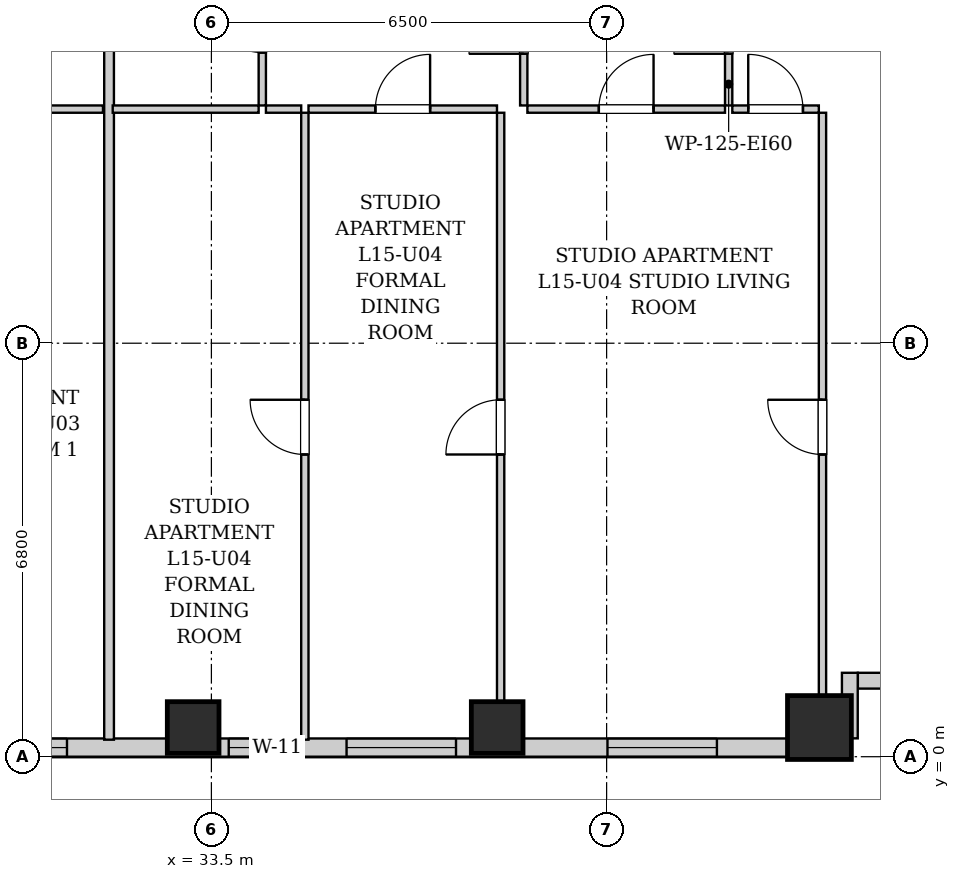
"""IFC4 building model, lengths in metres.
Left out: names, types, materials, properties, quantities, classifications, styles, units other than length and angle.
Written with IfcOpenShell. Run it as: python <this file> out.ifc"""

import sys

from ifc_helpers import new_model, si_unit, direction, frame, frame_2d, origin, origin_2d, place, context, subcontext, project, spatial, rectangle, extrude, element, fill, save


model = new_model("IFC4")
c1 = context("Model", 3, precision=1e-05, world=origin(), true_north=direction((0.0, 1.0)))
c2 = subcontext(c1, "Body", "Model", "MODEL_VIEW")
j1 = project(units=[si_unit("LENGTHUNIT", "METRE"), si_unit("PLANEANGLEUNIT", "RADIAN")], contexts=[c1])
p1 = place(None, origin())
s1 = spatial("IfcSite", under=j1, at=p1, CompositionType="ELEMENT")
p2 = place(p1, origin())
s2 = spatial("IfcBuilding", under=s1, at=p2, CompositionType="ELEMENT")
p3 = place(p2, frame((0.0, 0.0, 57.8)))
s3 = spatial("IfcBuildingStorey", under=s2, at=p3, CompositionType="ELEMENT", Elevation=57.8)
for number, where, z_axis, x_axis in (
    (1, (33.2, 0.48, 0.0), (0.0, 0.0, 1.0), (1.0, 0.0, 0.0)),
    (2, (38.2, 0.48, 0.0), (0.0, 0.0, 1.0), (1.0, 0.0, 0.0)),
):
    element("IfcColumn", number, at=place(p3, frame(where, z_axis=z_axis, x_axis=x_axis)), inside=s3, PredefinedType="COLUMN", context=c2, shape_type="SweptSolid", body=[
        extrude(rectangle(XDim=0.85, YDim=0.85, at=origin_2d()), origin(), (0.0, 0.0, 1.0), 3.2),
    ])
p4 = place(p3, frame((43.5, 0.48, 0.0), z_axis=(0.0, 0.0, 1.0), x_axis=(1.0, 0.0, 0.0)))
e3 = element("IfcColumn", 3, at=p4, inside=s3, PredefinedType="COLUMN", context=c2, shape_type="SweptSolid", body=[
    extrude(rectangle(XDim=1.05, YDim=1.05, at=origin_2d()), origin(), (0.0, 0.0, 1.0), 3.2),
])
p5 = place(p3, frame((44.0, 0.15, 0.0), z_axis=(0.0, 0.0, 1.0), x_axis=(-1.0, 0.0, 0.0)))
e4 = element("IfcWall", 4, at=p5, inside=s3, PredefinedType="SOLIDWALL", context=c2, shape_type="SweptSolid", body=[
    extrude(rectangle(XDim=27.55, YDim=0.3, at=frame_2d((13.775, 0.0))), origin(), (0.0, 0.0, 1.0), 1.975),
])
p6 = place(p5, frame((23.64, 0.0, 0.55)))
e5 = element("IfcOpeningElement", 5, at=p6, cuts=e4, PredefinedType="OPENING", context=c2, shape_type="SweptSolid", body=[
    extrude(rectangle(XDim=1.8, YDim=1.2, at=frame_2d((0.9, 0.6))), frame((0.0, 0.16, 0.0), z_axis=(0.0, -1.0, 0.0), x_axis=(1.0, 0.0, 0.0)), (0.0, 0.0, 1.0), 0.32),
])
p7 = place(p5, frame((21.5, 0.0, 0.55)))
e6 = element("IfcOpeningElement", 6, at=p7, cuts=e4, PredefinedType="OPENING", context=c2, shape_type="SweptSolid", body=[
    extrude(rectangle(XDim=0.85, YDim=1.2, at=frame_2d((0.425, 0.6))), frame((0.0, 0.16, 0.0), z_axis=(0.0, -1.0, 0.0), x_axis=(1.0, 0.0, 0.0)), (0.0, 0.0, 1.0), 0.32),
])
p8 = place(p5, frame((15.65, 0.0, 0.55)))
e7 = element("IfcOpeningElement", 7, at=p8, cuts=e4, PredefinedType="OPENING", context=c2, shape_type="SweptSolid", body=[
    extrude(rectangle(XDim=0.85, YDim=1.2, at=frame_2d((0.425, 0.6))), frame((0.0, 0.16, 0.0), z_axis=(0.0, -1.0, 0.0), x_axis=(1.0, 0.0, 0.0)), (0.0, 0.0, 1.0), 0.32),
])
p9 = place(p5, frame((12.875, 0.0, 0.55)))
e8 = element("IfcOpeningElement", 8, at=p9, cuts=e4, PredefinedType="OPENING", context=c2, shape_type="SweptSolid", body=[
    extrude(rectangle(XDim=1.8, YDim=1.2, at=frame_2d((0.9, 0.6))), frame((0.0, 0.16, 0.0), z_axis=(0.0, -1.0, 0.0), x_axis=(1.0, 0.0, 0.0)), (0.0, 0.0, 1.0), 0.32),
])
p10 = place(p5, frame((9.365, 0.0, 0.55)))
e9 = element("IfcOpeningElement", 9, at=p10, cuts=e4, PredefinedType="OPENING", context=c2, shape_type="SweptSolid", body=[
    extrude(rectangle(XDim=0.85, YDim=1.2, at=frame_2d((0.425, 0.6))), frame((0.0, 0.16, 0.0), z_axis=(0.0, -1.0, 0.0), x_axis=(1.0, 0.0, 0.0)), (0.0, 0.0, 1.0), 0.32),
])
p11 = place(p5, frame((6.477, 0.0, 0.55)))
e10 = element("IfcOpeningElement", 10, at=p11, cuts=e4, PredefinedType="OPENING", context=c2, shape_type="SweptSolid", body=[
    extrude(rectangle(XDim=1.8, YDim=1.2, at=frame_2d((0.9, 0.6))), frame((0.0, 0.16, 0.0), z_axis=(0.0, -1.0, 0.0), x_axis=(1.0, 0.0, 0.0)), (0.0, 0.0, 1.0), 0.32),
])
p12 = place(p5, frame((2.186, 0.0, 0.55)))
e11 = element("IfcOpeningElement", 11, at=p12, cuts=e4, PredefinedType="OPENING", context=c2, shape_type="SweptSolid", body=[
    extrude(rectangle(XDim=1.8, YDim=1.2, at=frame_2d((0.9, 0.6))), frame((0.0, 0.16, 0.0), z_axis=(0.0, -1.0, 0.0), x_axis=(1.0, 0.0, 0.0)), (0.0, 0.0, 1.0), 0.32),
])
p13 = place(p3, frame((45.118, 1.25, 0.0), z_axis=(0.0, 0.0, 1.0), x_axis=(-1.0, 0.0, 0.0)))
e12 = element("IfcWall", 12, at=p13, inside=s3, PredefinedType="SOLIDWALL", context=c2, shape_type="SweptSolid", body=[
    extrude(rectangle(XDim=0.986, YDim=0.26, at=frame_2d((0.493, 0.0))), origin(), (0.0, 0.0, 1.0), 2.94),
])
p14 = place(p3, frame((44.0, 1.38, 0.0), z_axis=(0.0, 0.0, 1.0), x_axis=(0.0, -1.0, 0.0)))
e13 = element("IfcWall", 13, at=p14, inside=s3, PredefinedType="SOLIDWALL", context=c2, shape_type="SweptSolid", body=[
    extrude(rectangle(XDim=1.078, YDim=0.26, at=frame_2d((0.539, 0.0))), origin(), (0.0, 0.0, 1.0), 2.94),
])
p15 = place(p3, frame((28.799, 10.65, 0.0), z_axis=(0.0, 0.0, 1.0), x_axis=(1.0, 0.0, 0.0)))
e14 = element("IfcWall", 14, at=p15, inside=s3, PredefinedType="PARTITIONING", context=c2, shape_type="SweptSolid", body=[
    extrude(rectangle(XDim=2.918, YDim=0.12, at=frame_2d((1.459, 0.0))), origin(), (0.0, 0.0, 1.0), 2.94),
])
p16 = place(p15, frame((1.009, 0.0, 0.0)))
e15 = element("IfcOpeningElement", 15, at=p16, cuts=e14, PredefinedType="OPENING", context=c2, shape_type="SweptSolid", body=[
    extrude(rectangle(XDim=0.9, YDim=2.05, at=frame_2d((0.45, 1.025))), frame((0.0, 0.07, 0.0), z_axis=(0.0, -1.0, 0.0), x_axis=(1.0, 0.0, 0.0)), (0.0, 0.0, 1.0), 0.14),
])
p17 = place(p3, frame((31.817, 0.28, 0.0), z_axis=(0.0, 0.0, 1.0), x_axis=(0.0, 1.0, 0.0)))
e16 = element("IfcWall", 16, at=p17, inside=s3, PredefinedType="PARTITIONING", context=c2, shape_type="SweptSolid", body=[
    extrude(rectangle(XDim=13.03, YDim=0.16, at=frame_2d((6.515, 0.0))), origin(), (0.0, 0.0, 1.0), 2.94),
])
p18 = place(p3, frame((34.337, 10.71, 0.0), z_axis=(0.0, 0.0, 1.0), x_axis=(0.0, 1.0, 0.0)))
e17 = element("IfcWall", 17, at=p18, inside=s3, PredefinedType="PARTITIONING", context=c2, shape_type="SweptSolid", body=[
    extrude(rectangle(XDim=2.6, YDim=0.12, at=frame_2d((1.3, 0.0))), origin(), (0.0, 0.0, 1.0), 2.94),
])
p19 = place(p18, frame((0.87, 0.0, 0.0)))
e18 = element("IfcOpeningElement", 18, at=p19, cuts=e17, PredefinedType="OPENING", context=c2, shape_type="SweptSolid", body=[
    extrude(rectangle(XDim=0.86, YDim=2.05, at=frame_2d((0.43, 1.025))), frame((0.0, 0.07, 0.0), z_axis=(0.0, -1.0, 0.0), x_axis=(1.0, 0.0, 0.0)), (0.0, 0.0, 1.0), 0.14),
])
p20 = place(p3, frame((31.877, 10.65, 0.0), z_axis=(0.0, 0.0, 1.0), x_axis=(1.0, 0.0, 0.0)))
e19 = element("IfcWall", 19, at=p20, inside=s3, PredefinedType="PARTITIONING", context=c2, shape_type="SweptSolid", body=[
    extrude(rectangle(XDim=2.4, YDim=0.12, at=frame_2d((1.2, 0.0))), origin(), (0.0, 0.0, 1.0), 2.94),
])
p21 = place(p3, frame((38.637, 10.71, 0.0), z_axis=(0.0, 0.0, 1.0), x_axis=(0.0, 1.0, 0.0)))
e20 = element("IfcWall", 20, at=p21, inside=s3, PredefinedType="PARTITIONING", context=c2, shape_type="SweptSolid", body=[
    extrude(rectangle(XDim=2.6, YDim=0.12, at=frame_2d((1.3, 0.0))), origin(), (0.0, 0.0, 1.0), 2.94),
])
p22 = place(p21, frame((0.85, 0.0, 0.0)))
e21 = element("IfcOpeningElement", 21, at=p22, cuts=e20, PredefinedType="OPENING", context=c2, shape_type="SweptSolid", body=[
    extrude(rectangle(XDim=0.9, YDim=2.05, at=frame_2d((0.45, 1.025))), frame((0.0, 0.07, 0.0), z_axis=(0.0, -1.0, 0.0), x_axis=(1.0, 0.0, 0.0)), (0.0, 0.0, 1.0), 0.14),
])
p23 = place(p3, frame((34.397, 10.65, 0.0), z_axis=(0.0, 0.0, 1.0), x_axis=(1.0, 0.0, 0.0)))
e22 = element("IfcWall", 22, at=p23, inside=s3, PredefinedType="PARTITIONING", context=c2, shape_type="SweptSolid", body=[
    extrude(rectangle(XDim=0.58, YDim=0.12, at=frame_2d((0.29, 0.0))), origin(), (0.0, 0.0, 1.0), 2.94),
])
p24 = place(p3, frame((35.097, 10.65, 0.0), z_axis=(0.0, 0.0, 1.0), x_axis=(1.0, 0.0, 0.0)))
e23 = element("IfcWall", 23, at=p24, inside=s3, PredefinedType="PARTITIONING", context=c2, shape_type="SweptSolid", body=[
    extrude(rectangle(XDim=3.1, YDim=0.12, at=frame_2d((1.55, 0.0))), origin(), (0.0, 0.0, 1.0), 2.94),
])
p25 = place(p24, frame((1.1, 0.0, 0.0)))
e24 = element("IfcOpeningElement", 24, at=p25, cuts=e23, PredefinedType="OPENING", context=c2, shape_type="SweptSolid", body=[
    extrude(rectangle(XDim=0.9, YDim=2.05, at=frame_2d((0.45, 1.025))), frame((0.0, 0.07, 0.0), z_axis=(0.0, -1.0, 0.0), x_axis=(1.0, 0.0, 0.0)), (0.0, 0.0, 1.0), 0.14),
])
p26 = place(p3, frame((42.007, 10.71, 0.0), z_axis=(0.0, 0.0, 1.0), x_axis=(0.0, 1.0, 0.0)))
e25 = element("IfcWall", 25, at=p26, inside=s3, PredefinedType="PARTITIONING", context=c2, shape_type="SweptSolid", body=[
    extrude(rectangle(XDim=2.6, YDim=0.12, at=frame_2d((1.3, 0.0))), origin(), (0.0, 0.0, 1.0), 2.94),
])
p27 = place(p26, frame((0.85, 0.0, 0.0)))
e26 = element("IfcOpeningElement", 26, at=p27, cuts=e25, PredefinedType="OPENING", context=c2, shape_type="SweptSolid", body=[
    extrude(rectangle(XDim=0.9, YDim=2.05, at=frame_2d((0.45, 1.025))), frame((0.0, 0.07, 0.0), z_axis=(0.0, -1.0, 0.0), x_axis=(1.0, 0.0, 0.0)), (0.0, 0.0, 1.0), 0.14),
])
p28 = place(p3, frame((38.697, 10.65, 0.0), z_axis=(0.0, 0.0, 1.0), x_axis=(1.0, 0.0, 0.0)))
e27 = element("IfcWall", 27, at=p28, inside=s3, PredefinedType="PARTITIONING", context=c2, shape_type="SweptSolid", body=[
    extrude(rectangle(XDim=3.25, YDim=0.12, at=frame_2d((1.625, 0.0))), origin(), (0.0, 0.0, 1.0), 2.94),
])
p29 = place(p28, frame((1.175, 0.0, 0.0)))
e28 = element("IfcOpeningElement", 28, at=p29, cuts=e27, PredefinedType="OPENING", context=c2, shape_type="SweptSolid", body=[
    extrude(rectangle(XDim=0.9, YDim=2.05, at=frame_2d((0.45, 1.025))), frame((0.0, 0.07, 0.0), z_axis=(0.0, -1.0, 0.0), x_axis=(1.0, 0.0, 0.0)), (0.0, 0.0, 1.0), 0.14),
])
p30 = place(p3, frame((42.067, 10.65, 0.0), z_axis=(0.0, 0.0, 1.0), x_axis=(1.0, 0.0, 0.0)))
e29 = element("IfcWall", 29, at=p30, inside=s3, PredefinedType="PARTITIONING", context=c2, shape_type="SweptSolid", body=[
    extrude(rectangle(XDim=1.423, YDim=0.12, at=frame_2d((0.711, 0.0))), origin(), (0.0, 0.0, 1.0), 2.94),
])
p31 = place(p30, frame((0.262, 0.0, 0.0)))
e30 = element("IfcOpeningElement", 30, at=p31, cuts=e29, PredefinedType="OPENING", context=c2, shape_type="SweptSolid", body=[
    extrude(rectangle(XDim=0.9, YDim=2.05, at=frame_2d((0.45, 1.025))), frame((0.0, 0.07, 0.0), z_axis=(0.0, -1.0, 0.0), x_axis=(1.0, 0.0, 0.0)), (0.0, 0.0, 1.0), 0.14),
])
p32 = place(p3, frame((35.037, 0.28, 0.0), z_axis=(0.0, 0.0, 1.0), x_axis=(0.0, 1.0, 0.0)))
e31 = element("IfcWall", 31, at=p32, inside=s3, PredefinedType="PARTITIONING", context=c2, shape_type="SweptSolid", body=[
    extrude(rectangle(XDim=10.31, YDim=0.12, at=frame_2d((5.155, 0.0))), origin(), (0.0, 0.0, 1.0), 2.94),
])
p33 = place(p32, frame((4.69, 0.0, 0.0)))
e32 = element("IfcOpeningElement", 32, at=p33, cuts=e31, PredefinedType="OPENING", context=c2, shape_type="SweptSolid", body=[
    extrude(rectangle(XDim=0.9, YDim=2.05, at=frame_2d((0.45, 1.025))), frame((0.0, 0.07, 0.0), z_axis=(0.0, -1.0, 0.0), x_axis=(1.0, 0.0, 0.0)), (0.0, 0.0, 1.0), 0.14),
])
p34 = place(p3, frame((38.257, 0.28, 0.0), z_axis=(0.0, 0.0, 1.0), x_axis=(0.0, 1.0, 0.0)))
e33 = element("IfcWall", 33, at=p34, inside=s3, PredefinedType="PARTITIONING", context=c2, shape_type="SweptSolid", body=[
    extrude(rectangle(XDim=10.31, YDim=0.12, at=frame_2d((5.155, 0.0))), origin(), (0.0, 0.0, 1.0), 2.94),
])
p35 = place(p34, frame((4.69, 0.0, 0.0)))
e34 = element("IfcOpeningElement", 34, at=p35, cuts=e33, PredefinedType="OPENING", context=c2, shape_type="SweptSolid", body=[
    extrude(rectangle(XDim=0.9, YDim=2.05, at=frame_2d((0.45, 1.025))), frame((0.0, 0.07, 0.0), z_axis=(0.0, -1.0, 0.0), x_axis=(1.0, 0.0, 0.0)), (0.0, 0.0, 1.0), 0.14),
])
p36 = place(p3, frame((43.55, 0.28, 0.0), z_axis=(0.0, 0.0, 1.0), x_axis=(0.0, 1.0, 0.0)))
e35 = element("IfcWall", 35, at=p36, inside=s3, PredefinedType="PARTITIONING", context=c2, shape_type="SweptSolid", body=[
    extrude(rectangle(XDim=10.31, YDim=0.12, at=frame_2d((5.155, 0.0))), origin(), (0.0, 0.0, 1.0), 2.94),
])
p37 = place(p36, frame((4.69, 0.0, 0.0)))
e36 = element("IfcOpeningElement", 36, at=p37, cuts=e35, PredefinedType="OPENING", context=c2, shape_type="SweptSolid", body=[
    extrude(rectangle(XDim=0.9, YDim=2.05, at=frame_2d((0.45, 1.025))), frame((0.0, 0.07, 0.0), z_axis=(0.0, -1.0, 0.0), x_axis=(1.0, 0.0, 0.0)), (0.0, 0.0, 1.0), 0.14),
])
p38 = place(p19, origin())
e37 = element("IfcDoor", 37, at=p38, inside=s3, OperationType="SINGLE_SWING_RIGHT", PredefinedType="DOOR", context=c2, shape_type="SweptSolid", body=[
    extrude(rectangle(XDim=0.86, YDim=2.05, at=frame_2d((0.43, 1.025))), frame((0.0, 0.025, 0.0), z_axis=(0.0, -1.0, 0.0), x_axis=(1.0, 0.0, 0.0)), (0.0, 0.0, 1.0), 0.05),
])
fill(e18, e37)
p39 = place(p22, origin())
e38 = element("IfcDoor", 38, at=p39, inside=s3, OperationType="SINGLE_SWING_LEFT", PredefinedType="DOOR", context=c2, shape_type="SweptSolid", body=[
    extrude(rectangle(XDim=0.9, YDim=2.05, at=frame_2d((0.45, 1.025))), frame((0.0, 0.025, 0.0), z_axis=(0.0, -1.0, 0.0), x_axis=(1.0, 0.0, 0.0)), (0.0, 0.0, 1.0), 0.05),
])
fill(e21, e38)
p40 = place(p25, origin())
e39 = element("IfcDoor", 39, at=p40, inside=s3, OperationType="SINGLE_SWING_RIGHT", PredefinedType="DOOR", context=c2, shape_type="SweptSolid", body=[
    extrude(rectangle(XDim=0.9, YDim=2.05, at=frame_2d((0.45, 1.025))), frame((0.0, 0.025, 0.0), z_axis=(0.0, -1.0, 0.0), x_axis=(1.0, 0.0, 0.0)), (0.0, 0.0, 1.0), 0.05),
])
fill(e24, e39)
p41 = place(p27, origin())
e40 = element("IfcDoor", 40, at=p41, inside=s3, OperationType="SINGLE_SWING_LEFT", PredefinedType="DOOR", context=c2, shape_type="SweptSolid", body=[
    extrude(rectangle(XDim=0.9, YDim=2.05, at=frame_2d((0.45, 1.025))), frame((0.0, 0.025, 0.0), z_axis=(0.0, -1.0, 0.0), x_axis=(1.0, 0.0, 0.0)), (0.0, 0.0, 1.0), 0.05),
])
fill(e26, e40)
p42 = place(p29, origin())
e41 = element("IfcDoor", 41, at=p42, inside=s3, OperationType="SINGLE_SWING_RIGHT", PredefinedType="DOOR", context=c2, shape_type="SweptSolid", body=[
    extrude(rectangle(XDim=0.9, YDim=2.05, at=frame_2d((0.45, 1.025))), frame((0.0, 0.025, 0.0), z_axis=(0.0, -1.0, 0.0), x_axis=(1.0, 0.0, 0.0)), (0.0, 0.0, 1.0), 0.05),
])
fill(e28, e41)
p43 = place(p31, origin())
e42 = element("IfcDoor", 42, at=p43, inside=s3, OperationType="SINGLE_SWING_LEFT", PredefinedType="DOOR", context=c2, shape_type="SweptSolid", body=[
    extrude(rectangle(XDim=0.9, YDim=2.05, at=frame_2d((0.45, 1.025))), frame((0.0, 0.025, 0.0), z_axis=(0.0, -1.0, 0.0), x_axis=(1.0, 0.0, 0.0)), (0.0, 0.0, 1.0), 0.05),
])
fill(e30, e42)
p44 = place(p33, origin())
e43 = element("IfcDoor", 43, at=p44, inside=s3, OperationType="SINGLE_SWING_RIGHT", PredefinedType="DOOR", context=c2, shape_type="SweptSolid", body=[
    extrude(rectangle(XDim=0.9, YDim=2.05, at=frame_2d((0.45, 1.025))), frame((0.0, 0.025, 0.0), z_axis=(0.0, -1.0, 0.0), x_axis=(1.0, 0.0, 0.0)), (0.0, 0.0, 1.0), 0.05),
])
fill(e32, e43)
p45 = place(p35, origin())
e44 = element("IfcDoor", 44, at=p45, inside=s3, OperationType="SINGLE_SWING_LEFT", PredefinedType="DOOR", context=c2, shape_type="SweptSolid", body=[
    extrude(rectangle(XDim=0.9, YDim=2.05, at=frame_2d((0.45, 1.025))), frame((0.0, 0.025, 0.0), z_axis=(0.0, -1.0, 0.0), x_axis=(1.0, 0.0, 0.0)), (0.0, 0.0, 1.0), 0.05),
])
fill(e34, e44)
p46 = place(p37, origin())
e45 = element("IfcDoor", 45, at=p46, inside=s3, OperationType="SINGLE_SWING_RIGHT", PredefinedType="DOOR", context=c2, shape_type="SweptSolid", body=[
    extrude(rectangle(XDim=0.9, YDim=2.05, at=frame_2d((0.45, 1.025))), frame((0.0, 0.025, 0.0), z_axis=(0.0, -1.0, 0.0), x_axis=(1.0, 0.0, 0.0)), (0.0, 0.0, 1.0), 0.05),
])
fill(e36, e45)
p47 = place(p9, origin())
e46 = element("IfcWindow", 46, at=p47, inside=s3, PartitioningType="DOUBLE_PANEL_VERTICAL", PredefinedType="WINDOW", context=c2, shape_type="SweptSolid", body=[
    extrude(rectangle(XDim=1.8, YDim=1.2, at=frame_2d((0.9, 0.6))), frame((0.0, 0.03, 0.0), z_axis=(0.0, -1.0, 0.0), x_axis=(1.0, 0.0, 0.0)), (0.0, 0.0, 1.0), 0.06),
])
fill(e8, e46)
p48 = place(p10, origin())
e47 = element("IfcWindow", 47, at=p48, inside=s3, PartitioningType="SINGLE_PANEL", PredefinedType="WINDOW", context=c2, shape_type="SweptSolid", body=[
    extrude(rectangle(XDim=0.85, YDim=1.2, at=frame_2d((0.425, 0.6))), frame((0.0, 0.03, 0.0), z_axis=(0.0, -1.0, 0.0), x_axis=(1.0, 0.0, 0.0)), (0.0, 0.0, 1.0), 0.06),
])
fill(e9, e47)
p49 = place(p11, origin())
e48 = element("IfcWindow", 48, at=p49, inside=s3, PartitioningType="DOUBLE_PANEL_VERTICAL", PredefinedType="WINDOW", context=c2, shape_type="SweptSolid", body=[
    extrude(rectangle(XDim=1.8, YDim=1.2, at=frame_2d((0.9, 0.6))), frame((0.0, 0.03, 0.0), z_axis=(0.0, -1.0, 0.0), x_axis=(1.0, 0.0, 0.0)), (0.0, 0.0, 1.0), 0.06),
])
fill(e10, e48)
p50 = place(p12, origin())
e49 = element("IfcWindow", 49, at=p50, inside=s3, PartitioningType="DOUBLE_PANEL_VERTICAL", PredefinedType="WINDOW", context=c2, shape_type="SweptSolid", body=[
    extrude(rectangle(XDim=1.8, YDim=1.2, at=frame_2d((0.9, 0.6))), frame((0.0, 0.03, 0.0), z_axis=(0.0, -1.0, 0.0), x_axis=(1.0, 0.0, 0.0)), (0.0, 0.0, 1.0), 0.06),
])
fill(e11, e49)
save(model, sys.argv[1])
